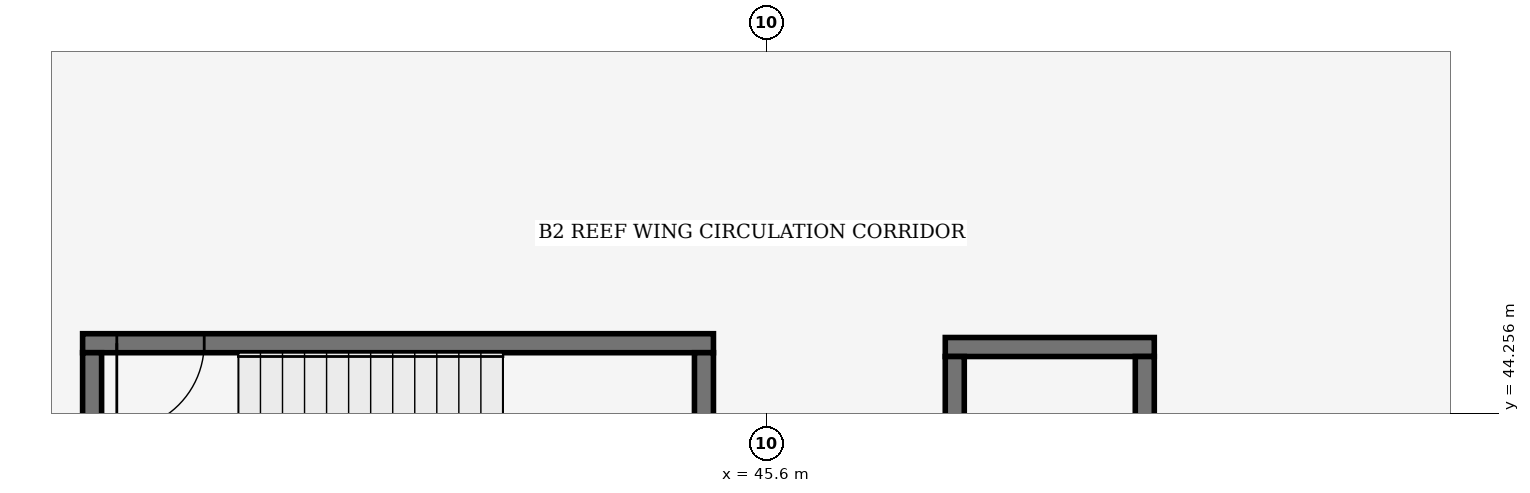
"""IFC4 building model, lengths in metres.
Left out: names, types, materials, properties, quantities, classifications, styles, units other than length and angle.
Written with IfcOpenShell. Run it as: python <this file> out.ifc"""

import sys

from ifc_helpers import new_model, si_unit, direction, frame, frame_2d, origin, place, context, subcontext, project, spatial, rectangle, extrude, element, fill, save


model = new_model("IFC4")
c1 = context("Model", 3, precision=1e-05, world=origin(), true_north=direction((0.0, 1.0)))
c2 = subcontext(c1, "Body", "Model", "MODEL_VIEW")
j1 = project(units=[si_unit("LENGTHUNIT", "METRE"), si_unit("PLANEANGLEUNIT", "RADIAN")], contexts=[c1])
p1 = place(None, origin())
s1 = spatial("IfcSite", under=j1, at=p1, CompositionType="ELEMENT")
p2 = place(p1, origin())
s2 = spatial("IfcBuilding", under=s1, at=p2, CompositionType="ELEMENT")
p3 = place(p2, frame((0.0, 0.0, -9.6)))
s3 = spatial("IfcBuildingStorey", under=s2, at=p3, CompositionType="ELEMENT", Elevation=-9.6)
p4 = place(p3, frame((44.9, 45.175, 0.0), z_axis=(0.0, 0.0, 1.0), x_axis=(-1.0, 0.0, 0.0)))
e1 = element("IfcWall", 1, at=p4, inside=s3, PredefinedType="SHEAR", context=c2, shape_type="SweptSolid", body=[
    extrude(rectangle(XDim=8.3, YDim=0.25, at=frame_2d((4.15, 0.0))), origin(), (0.0, 0.0, 1.0), 4.5),
])
p5 = place(p4, frame((7.85, 0.0, 0.0), z_axis=(0.0, 0.0, 1.0), x_axis=(-1.0, 0.0, 0.0)))
e2 = element("IfcOpeningElement", 2, at=p5, cuts=e1, PredefinedType="OPENING", context=c2, shape_type="SweptSolid", body=[
    extrude(rectangle(XDim=1.15, YDim=2.2, at=frame_2d((0.575, 1.1))), frame((0.0, 0.135, 0.0), z_axis=(0.0, -1.0, 0.0), x_axis=(1.0, 0.0, 0.0)), (0.0, 0.0, 1.0), 0.27),
])
for number, where, z_axis, x_axis in (
    (3, (36.725, 45.05, 0.0), (0.0, 0.0, 1.0), (0.0, -1.0, 0.0)),
    (4, (44.775, 41.6, 0.0), (0.0, 0.0, 1.0), (0.0, 1.0, 0.0)),
):
    element("IfcWall", number, at=place(p3, frame(where, z_axis=z_axis, x_axis=x_axis)), inside=s3, PredefinedType="SHEAR", context=c2, shape_type="SweptSolid", body=[
        extrude(rectangle(XDim=3.45, YDim=0.25, at=frame_2d((1.725, 0.0))), origin(), (0.0, 0.0, 1.0), 4.5),
    ])
p6 = place(p3, frame((47.95, 45.125, 0.0), z_axis=(0.0, 0.0, 1.0), x_axis=(1.0, 0.0, 0.0)))
e5 = element("IfcWall", 5, at=p6, inside=s3, PredefinedType="SHEAR", context=c2, shape_type="SweptSolid", body=[
    extrude(rectangle(XDim=2.75, YDim=0.25, at=frame_2d((1.375, 0.0))), origin(), (0.0, 0.0, 1.0), 4.5),
])
for number, where, z_axis, x_axis in (
    (6, (48.075, 42.0, 0.0), (0.0, 0.0, 1.0), (0.0, 1.0, 0.0)),
    (7, (50.575, 42.0, 0.0), (0.0, 0.0, 1.0), (0.0, 1.0, 0.0)),
):
    element("IfcWall", number, at=place(p3, frame(where, z_axis=z_axis, x_axis=x_axis)), inside=s3, PredefinedType="SHEAR", context=c2, shape_type="SweptSolid", body=[
        extrude(rectangle(XDim=3.0, YDim=0.25, at=frame_2d((1.5, 0.0))), origin(), (0.0, 0.0, 1.0), 4.5),
    ])
p7 = place(p5, origin())
e8 = element("IfcDoor", 8, at=p7, inside=s3, OperationType="SINGLE_SWING_LEFT", PredefinedType="DOOR", context=c2, shape_type="SweptSolid", body=[
    extrude(rectangle(XDim=1.15, YDim=2.2, at=frame_2d((0.575, 1.1))), frame((0.0, 0.025, 0.0), z_axis=(0.0, -1.0, 0.0), x_axis=(1.0, 0.0, 0.0)), (0.0, 0.0, 1.0), 0.05),
])
fill(e2, e8)
save(model, sys.argv[1])
